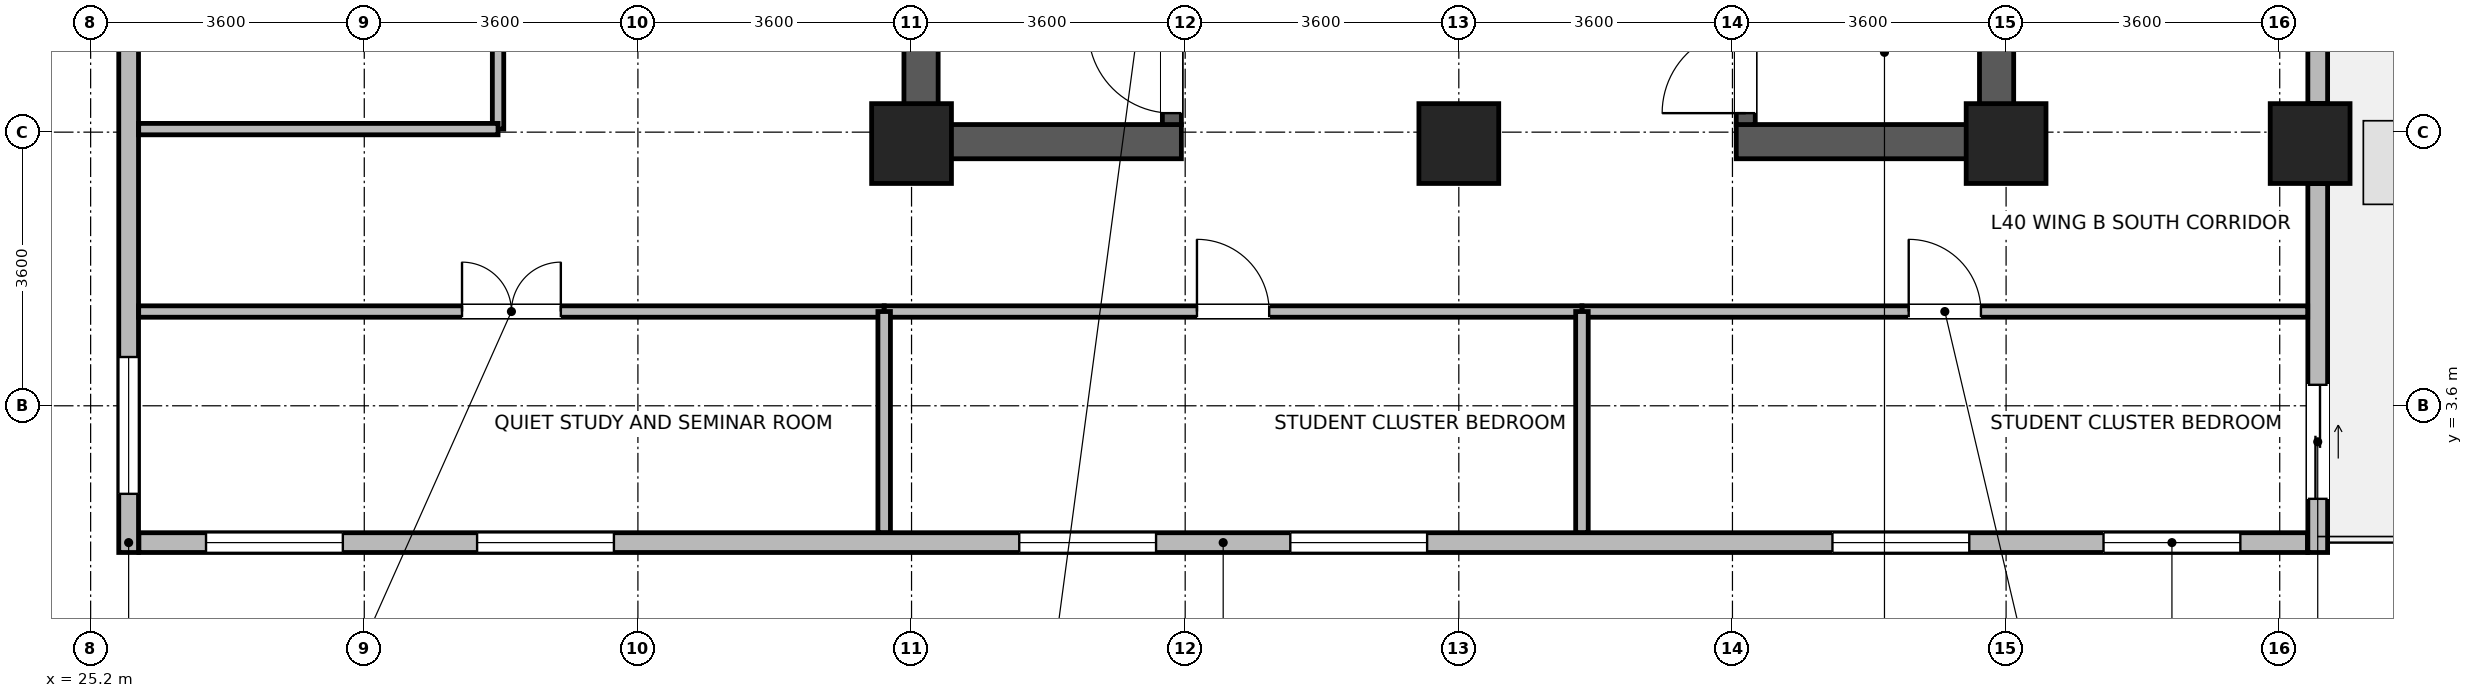
"""IFC4 building model, lengths in metres.
Left out: names, types, materials, properties, quantities, classifications, styles, units other than length and angle.
Written with IfcOpenShell. Run it as: python <this file> out.ifc"""

import sys

from ifc_helpers import new_model, si_unit, direction, frame, frame_2d, origin, origin_2d, place, context, subcontext, project, spatial, rectangle, extrude, source, transform, mapped, element, fill, save


model = new_model("IFC4")
c1 = context("Model", 3, precision=1e-05, world=origin(), true_north=direction((0.0, 1.0)))
c2 = subcontext(c1, "Body", "Model", "MODEL_VIEW")
j1 = project(units=[si_unit("LENGTHUNIT", "METRE"), si_unit("PLANEANGLEUNIT", "RADIAN")], contexts=[c1])
p1 = place(None, origin())
s1 = spatial("IfcSite", under=j1, at=p1, CompositionType="ELEMENT")
p2 = place(p1, origin())
s2 = spatial("IfcBuilding", under=s1, at=p2, CompositionType="ELEMENT")
p3 = place(p2, frame((0.0, 0.0, 158.7)))
s3 = spatial("IfcBuildingStorey", under=s2, at=p3, CompositionType="ELEMENT", Elevation=158.7)
for number, where, z_axis, x_axis in (
    (1, (36.125, 6.85, 0.0), (0.0, 0.0, 1.0), (0.0, 1.0, 0.0)),
    (2, (50.275, 6.85, 0.0), (0.0, 0.0, 1.0), (0.0, 1.0, 0.0)),
):
    element("IfcWall", number, at=place(p3, frame(where, z_axis=z_axis, x_axis=x_axis)), inside=s3, PredefinedType="SHEAR", context=c2, shape_type="SweptSolid", body=[
        extrude(rectangle(XDim=7.9, YDim=0.45, at=frame_2d((3.95, 0.0))), origin(), (0.0, 0.0, 1.0), 3.46),
    ])
for number, where, z_axis, x_axis in (
    (3, (36.35, 7.075, 0.0), (0.0, 0.0, 1.0), (1.0, 0.0, 0.0)),
    (4, (46.85, 7.075, 0.0), (0.0, 0.0, 1.0), (1.0, 0.0, 0.0)),
):
    element("IfcWall", number, at=place(p3, frame(where, z_axis=z_axis, x_axis=x_axis)), inside=s3, PredefinedType="SHEAR", context=c2, shape_type="SweptSolid", body=[
        extrude(rectangle(XDim=3.2, YDim=0.45, at=frame_2d((1.6, 0.0))), origin(), (0.0, 0.0, 1.0), 3.46),
    ])
p4 = place(p3, frame((39.425, 7.3, 0.0), z_axis=(0.0, 0.0, 1.0), x_axis=(0.0, 1.0, 0.0)))
e5 = element("IfcWall", 5, at=p4, inside=s3, PredefinedType="SHEAR", context=c2, shape_type="SweptSolid", body=[
    extrude(rectangle(XDim=7.0, YDim=0.25, at=frame_2d((3.5, 0.0))), origin(), (0.0, 0.0, 1.0), 3.46),
])
p5 = place(p4, frame((0.15, 0.0, 0.0)))
e6 = element("IfcOpeningElement", 6, at=p5, cuts=e5, PredefinedType="OPENING", context=c2, shape_type="SweptSolid", body=[
    extrude(rectangle(XDim=1.1, YDim=2.08, at=frame_2d((0.55, 1.04))), frame((0.0, 0.135, 0.0), z_axis=(0.0, -1.0, 0.0), x_axis=(1.0, 0.0, 0.0)), (0.0, 0.0, 1.0), 0.27),
])
p6 = place(p3, frame((46.975, 7.3, 0.0), z_axis=(0.0, 0.0, 1.0), x_axis=(0.0, 1.0, 0.0)))
e7 = element("IfcWall", 7, at=p6, inside=s3, PredefinedType="SHEAR", context=c2, shape_type="SweptSolid", body=[
    extrude(rectangle(XDim=7.0, YDim=0.25, at=frame_2d((3.5, 0.0))), origin(), (0.0, 0.0, 1.0), 3.46),
])
p7 = place(p6, frame((0.15, 0.0, 0.0)))
e8 = element("IfcOpeningElement", 8, at=p7, cuts=e7, PredefinedType="OPENING", context=c2, shape_type="SweptSolid", body=[
    extrude(rectangle(XDim=1.1, YDim=2.08, at=frame_2d((0.55, 1.04))), frame((0.0, 0.135, 0.0), z_axis=(0.0, -1.0, 0.0), x_axis=(1.0, 0.0, 0.0)), (0.0, 0.0, 1.0), 0.27),
])
m1 = source(origin(), c2, "Body", "SweptSolid", [
    extrude(rectangle(XDim=1.05, YDim=1.05, at=origin_2d()), origin(), (0.0, 0.0, 1.0), 3.7),
])
for number, where, z_axis, x_axis in (
    (9, (36.0, 7.05, 0.0), (0.0, 0.0, 1.0), (1.0, 0.0, 0.0)),
    (10, (43.2, 7.05, 0.0), (0.0, 0.0, 1.0), (1.0, 0.0, 0.0)),
    (11, (50.4, 7.05, 0.0), (0.0, 0.0, 1.0), (1.0, 0.0, 0.0)),
    (12, (54.4, 7.05, 0.0), (0.0, 0.0, 1.0), (1.0, 0.0, 0.0)),
):
    element("IfcColumn", number, at=place(p3, frame(where, z_axis=z_axis, x_axis=x_axis)), inside=s3, PredefinedType="COLUMN", context=c2, shape_type="MappedRepresentation", body=[
        mapped(m1, transform((0.0, 0.0, 0.0), x_axis=(1.0, 0.0, 0.0), y_axis=(0.0, 1.0, 0.0), z_axis=(0.0, 0.0, 1.0), scale=1.0)),
    ])
p8 = place(p3, frame((54.365, 1.8, 0.0), z_axis=(0.0, 0.0, 1.0), x_axis=(-1.0, 0.0, 0.0)))
e13 = element("IfcWall", 13, at=p8, inside=s3, PredefinedType="STANDARD", context=c2, shape_type="SweptSolid", body=[
    extrude(rectangle(XDim=28.53, YDim=0.26, at=frame_2d((14.265, 0.0))), origin(), (0.0, 0.0, 1.0), 3.44),
])
p9 = place(p8, frame((0.883, 0.0, 0.85)))
e14 = element("IfcOpeningElement", 14, at=p9, cuts=e13, PredefinedType="OPENING", context=c2, shape_type="SweptSolid", body=[
    extrude(rectangle(XDim=1.8, YDim=1.85, at=frame_2d((0.9, 0.925))), frame((0.0, 0.14, 0.0), z_axis=(0.0, -1.0, 0.0), x_axis=(1.0, 0.0, 0.0)), (0.0, 0.0, 1.0), 0.28),
])
p10 = place(p8, frame((4.449, 0.0, 0.85)))
e15 = element("IfcOpeningElement", 15, at=p10, cuts=e13, PredefinedType="OPENING", context=c2, shape_type="SweptSolid", body=[
    extrude(rectangle(XDim=1.8, YDim=1.85, at=frame_2d((0.9, 0.925))), frame((0.0, 0.14, 0.0), z_axis=(0.0, -1.0, 0.0), x_axis=(1.0, 0.0, 0.0)), (0.0, 0.0, 1.0), 0.28),
])
p11 = place(p8, frame((11.582, 0.0, 0.85)))
e16 = element("IfcOpeningElement", 16, at=p11, cuts=e13, PredefinedType="OPENING", context=c2, shape_type="SweptSolid", body=[
    extrude(rectangle(XDim=1.8, YDim=1.85, at=frame_2d((0.9, 0.925))), frame((0.0, 0.14, 0.0), z_axis=(0.0, -1.0, 0.0), x_axis=(1.0, 0.0, 0.0)), (0.0, 0.0, 1.0), 0.28),
])
p12 = place(p8, frame((15.148, 0.0, 0.85)))
e17 = element("IfcOpeningElement", 17, at=p12, cuts=e13, PredefinedType="OPENING", context=c2, shape_type="SweptSolid", body=[
    extrude(rectangle(XDim=1.8, YDim=1.85, at=frame_2d((0.9, 0.925))), frame((0.0, 0.14, 0.0), z_axis=(0.0, -1.0, 0.0), x_axis=(1.0, 0.0, 0.0)), (0.0, 0.0, 1.0), 0.28),
])
p13 = place(p8, frame((22.281, 0.0, 0.85)))
e18 = element("IfcOpeningElement", 18, at=p13, cuts=e13, PredefinedType="OPENING", context=c2, shape_type="SweptSolid", body=[
    extrude(rectangle(XDim=1.8, YDim=1.85, at=frame_2d((0.9, 0.925))), frame((0.0, 0.14, 0.0), z_axis=(0.0, -1.0, 0.0), x_axis=(1.0, 0.0, 0.0)), (0.0, 0.0, 1.0), 0.28),
])
p14 = place(p8, frame((25.847, 0.0, 0.85)))
e19 = element("IfcOpeningElement", 19, at=p14, cuts=e13, PredefinedType="OPENING", context=c2, shape_type="SweptSolid", body=[
    extrude(rectangle(XDim=1.8, YDim=1.85, at=frame_2d((0.9, 0.925))), frame((0.0, 0.14, 0.0), z_axis=(0.0, -1.0, 0.0), x_axis=(1.0, 0.0, 0.0)), (0.0, 0.0, 1.0), 0.28),
])
p15 = place(p3, frame((54.5, 6.524, 0.0), z_axis=(0.0, 0.0, 1.0), x_axis=(0.0, -1.0, 0.0)))
e20 = element("IfcWall", 20, at=p15, inside=s3, PredefinedType="STANDARD", context=c2, shape_type="SweptSolid", body=[
    extrude(rectangle(XDim=4.854, YDim=0.26, at=frame_2d((2.427, 0.0))), origin(), (0.0, 0.0, 1.0), 3.44),
])
p16 = place(p15, frame((2.648, 0.0, 0.0)))
e21 = element("IfcOpeningElement", 21, at=p16, cuts=e20, PredefinedType="OPENING", context=c2, shape_type="SweptSolid", body=[
    extrude(rectangle(XDim=1.5, YDim=2.15, at=frame_2d((0.75, 1.075))), frame((0.0, 0.14, 0.0), z_axis=(0.0, -1.0, 0.0), x_axis=(1.0, 0.0, 0.0)), (0.0, 0.0, 1.0), 0.28),
])
p17 = place(p3, frame((54.5, 14.024, 0.0), z_axis=(0.0, 0.0, 1.0), x_axis=(0.0, -1.0, 0.0)))
e22 = element("IfcWall", 22, at=p17, inside=s3, PredefinedType="STANDARD", context=c2, shape_type="SweptSolid", body=[
    extrude(rectangle(XDim=6.448, YDim=0.26, at=frame_2d((3.224, 0.0))), origin(), (0.0, 0.0, 1.0), 2.99),
])
p18 = place(p17, frame((3.936, 0.0, 0.85)))
e23 = element("IfcOpeningElement", 23, at=p18, cuts=e22, PredefinedType="OPENING", context=c2, shape_type="SweptSolid", body=[
    extrude(rectangle(XDim=1.8, YDim=1.85, at=frame_2d((0.9, 0.925))), frame((0.0, 0.14, 0.0), z_axis=(0.0, -1.0, 0.0), x_axis=(1.0, 0.0, 0.0)), (0.0, 0.0, 1.0), 0.28),
])
p19 = place(p17, frame((1.15, 0.0, 0.85)))
e24 = element("IfcOpeningElement", 24, at=p19, cuts=e22, PredefinedType="OPENING", context=c2, shape_type="SweptSolid", body=[
    extrude(rectangle(XDim=0.95, YDim=1.75, at=frame_2d((0.475, 0.875))), frame((0.0, 0.14, 0.0), z_axis=(0.0, -1.0, 0.0), x_axis=(1.0, 0.0, 0.0)), (0.0, 0.0, 1.0), 0.28),
])
p20 = place(p3, frame((25.7, 1.67, 0.0), z_axis=(0.0, 0.0, 1.0), x_axis=(0.0, 1.0, 0.0)))
e25 = element("IfcWall", 25, at=p20, inside=s3, PredefinedType="STANDARD", context=c2, shape_type="SweptSolid", body=[
    extrude(rectangle(XDim=20.06, YDim=0.26, at=frame_2d((10.03, 0.0))), origin(), (0.0, 0.0, 1.0), 3.44),
])
p21 = place(p20, frame((0.772, 0.0, 0.85)))
e26 = element("IfcOpeningElement", 26, at=p21, cuts=e25, PredefinedType="OPENING", context=c2, shape_type="SweptSolid", body=[
    extrude(rectangle(XDim=1.8, YDim=1.85, at=frame_2d((0.9, 0.925))), frame((0.0, 0.14, 0.0), z_axis=(0.0, -1.0, 0.0), x_axis=(1.0, 0.0, 0.0)), (0.0, 0.0, 1.0), 0.28),
])
p22 = place(p20, frame((7.458, 0.0, 0.85)))
e27 = element("IfcOpeningElement", 27, at=p22, cuts=e25, PredefinedType="OPENING", context=c2, shape_type="SweptSolid", body=[
    extrude(rectangle(XDim=1.8, YDim=1.85, at=frame_2d((0.9, 0.925))), frame((0.0, 0.14, 0.0), z_axis=(0.0, -1.0, 0.0), x_axis=(1.0, 0.0, 0.0)), (0.0, 0.0, 1.0), 0.28),
])
p23 = place(p20, frame((14.145, 0.0, 0.85)))
e28 = element("IfcOpeningElement", 28, at=p23, cuts=e25, PredefinedType="OPENING", context=c2, shape_type="SweptSolid", body=[
    extrude(rectangle(XDim=1.8, YDim=1.85, at=frame_2d((0.9, 0.925))), frame((0.0, 0.14, 0.0), z_axis=(0.0, -1.0, 0.0), x_axis=(1.0, 0.0, 0.0)), (0.0, 0.0, 1.0), 0.28),
])
p24 = place(p20, frame((17.488, 0.0, 0.85)))
e29 = element("IfcOpeningElement", 29, at=p24, cuts=e25, PredefinedType="OPENING", context=c2, shape_type="SweptSolid", body=[
    extrude(rectangle(XDim=1.8, YDim=1.85, at=frame_2d((0.9, 0.925))), frame((0.0, 0.14, 0.0), z_axis=(0.0, -1.0, 0.0), x_axis=(1.0, 0.0, 0.0)), (0.0, 0.0, 1.0), 0.28),
])
p25 = place(p3, frame((25.832, 4.84, 0.0), z_axis=(0.0, 0.0, 1.0), x_axis=(1.0, 0.0, 0.0)))
e30 = element("IfcWall", 30, at=p25, inside=s3, PredefinedType="PARTITIONING", context=c2, shape_type="SweptSolid", body=[
    extrude(rectangle(XDim=9.808, YDim=0.15, at=frame_2d((4.904, 0.0))), origin(), (0.0, 0.0, 1.0), 3.44),
])
p26 = place(p25, frame((4.254, 0.0, 0.0)))
e31 = element("IfcOpeningElement", 31, at=p26, cuts=e30, PredefinedType="OPENING", context=c2, shape_type="SweptSolid", body=[
    extrude(rectangle(XDim=1.3, YDim=2.12, at=frame_2d((0.65, 1.06))), frame((0.0, 0.085, 0.0), z_axis=(0.0, -1.0, 0.0), x_axis=(1.0, 0.0, 0.0)), (0.0, 0.0, 1.0), 0.17),
])
p27 = place(p3, frame((44.82, 4.84, 0.0), z_axis=(0.0, 0.0, 1.0), x_axis=(1.0, 0.0, 0.0)))
e32 = element("IfcWall", 32, at=p27, inside=s3, PredefinedType="PARTITIONING", context=c2, shape_type="SweptSolid", body=[
    extrude(rectangle(XDim=9.548, YDim=0.15, at=frame_2d((4.774, 0.0))), origin(), (0.0, 0.0, 1.0), 3.44),
])
p28 = place(p27, frame((4.299, 0.0, 0.0)))
e33 = element("IfcOpeningElement", 33, at=p28, cuts=e32, PredefinedType="OPENING", context=c2, shape_type="SweptSolid", body=[
    extrude(rectangle(XDim=0.95, YDim=2.1, at=frame_2d((0.475, 1.05))), frame((0.0, 0.085, 0.0), z_axis=(0.0, -1.0, 0.0), x_axis=(1.0, 0.0, 0.0)), (0.0, 0.0, 1.0), 0.17),
])
p29 = place(p3, frame((35.64, 4.84, 0.0), z_axis=(0.0, 0.0, 1.0), x_axis=(1.0, 0.0, 0.0)))
e34 = element("IfcWall", 34, at=p29, inside=s3, PredefinedType="PARTITIONING", context=c2, shape_type="SweptSolid", body=[
    extrude(rectangle(XDim=9.18, YDim=0.15, at=frame_2d((4.59, 0.0))), origin(), (0.0, 0.0, 1.0), 3.44),
])
p30 = place(p29, frame((4.115, 0.0, 0.0)))
e35 = element("IfcOpeningElement", 35, at=p30, cuts=e34, PredefinedType="OPENING", context=c2, shape_type="SweptSolid", body=[
    extrude(rectangle(XDim=0.95, YDim=2.1, at=frame_2d((0.475, 1.05))), frame((0.0, 0.085, 0.0), z_axis=(0.0, -1.0, 0.0), x_axis=(1.0, 0.0, 0.0)), (0.0, 0.0, 1.0), 0.17),
])
p31 = place(p3, frame((30.56, 7.24, 0.0), z_axis=(0.0, 0.0, 1.0), x_axis=(0.0, 1.0, 0.0)))
e36 = element("IfcWall", 36, at=p31, inside=s3, PredefinedType="PARTITIONING", context=c2, shape_type="SweptSolid", body=[
    extrude(rectangle(XDim=7.26, YDim=0.15, at=frame_2d((3.63, 0.0))), origin(), (0.0, 0.0, 1.0), 3.44),
])
p32 = place(p31, frame((2.98, 0.0, 0.0)))
e37 = element("IfcOpeningElement", 37, at=p32, cuts=e36, PredefinedType="OPENING", context=c2, shape_type="SweptSolid", body=[
    extrude(rectangle(XDim=1.3, YDim=2.12, at=frame_2d((0.65, 1.06))), frame((0.0, 0.085, 0.0), z_axis=(0.0, -1.0, 0.0), x_axis=(1.0, 0.0, 0.0)), (0.0, 0.0, 1.0), 0.17),
])
p33 = place(p3, frame((25.832, 7.24, 0.0), z_axis=(0.0, 0.0, 1.0), x_axis=(1.0, 0.0, 0.0)))
e38 = element("IfcWall", 38, at=p33, inside=s3, PredefinedType="PARTITIONING", context=c2, shape_type="SweptSolid", body=[
    extrude(rectangle(XDim=4.728, YDim=0.15, at=frame_2d((2.364, 0.0))), origin(), (0.0, 0.0, 1.0), 3.44),
])
for number, where, z_axis, x_axis in (
    (39, (35.64, 1.932, 0.0), (0.0, 0.0, 1.0), (0.0, 1.0, 0.0)),
    (40, (44.82, 1.932, 0.0), (0.0, 0.0, 1.0), (0.0, 1.0, 0.0)),
):
    element("IfcWall", number, at=place(p3, frame(where, z_axis=z_axis, x_axis=x_axis)), inside=s3, PredefinedType="PARTITIONING", context=c2, shape_type="SweptSolid", body=[
        extrude(rectangle(XDim=2.908, YDim=0.165, at=frame_2d((1.454, 0.0))), origin(), (0.0, 0.0, 1.0), 3.44),
    ])
p34 = place(p9, origin())
e41 = element("IfcWindow", 41, at=p34, inside=s3, PartitioningType="SINGLE_PANEL", PredefinedType="WINDOW", context=c2, shape_type="SweptSolid", body=[
    extrude(rectangle(XDim=1.8, YDim=1.85, at=frame_2d((0.9, 0.925))), frame((0.0, 0.03, 0.0), z_axis=(0.0, -1.0, 0.0), x_axis=(1.0, 0.0, 0.0)), (0.0, 0.0, 1.0), 0.06),
])
fill(e14, e41)
p35 = place(p10, origin())
e42 = element("IfcWindow", 42, at=p35, inside=s3, PartitioningType="SINGLE_PANEL", PredefinedType="WINDOW", context=c2, shape_type="SweptSolid", body=[
    extrude(rectangle(XDim=1.8, YDim=1.85, at=frame_2d((0.9, 0.925))), frame((0.0, 0.03, 0.0), z_axis=(0.0, -1.0, 0.0), x_axis=(1.0, 0.0, 0.0)), (0.0, 0.0, 1.0), 0.06),
])
fill(e15, e42)
p36 = place(p11, origin())
e43 = element("IfcWindow", 43, at=p36, inside=s3, PartitioningType="SINGLE_PANEL", PredefinedType="WINDOW", context=c2, shape_type="SweptSolid", body=[
    extrude(rectangle(XDim=1.8, YDim=1.85, at=frame_2d((0.9, 0.925))), frame((0.0, 0.03, 0.0), z_axis=(0.0, -1.0, 0.0), x_axis=(1.0, 0.0, 0.0)), (0.0, 0.0, 1.0), 0.06),
])
fill(e16, e43)
p37 = place(p12, origin())
e44 = element("IfcWindow", 44, at=p37, inside=s3, PartitioningType="SINGLE_PANEL", PredefinedType="WINDOW", context=c2, shape_type="SweptSolid", body=[
    extrude(rectangle(XDim=1.8, YDim=1.85, at=frame_2d((0.9, 0.925))), frame((0.0, 0.03, 0.0), z_axis=(0.0, -1.0, 0.0), x_axis=(1.0, 0.0, 0.0)), (0.0, 0.0, 1.0), 0.06),
])
fill(e17, e44)
p38 = place(p13, origin())
e45 = element("IfcWindow", 45, at=p38, inside=s3, PartitioningType="SINGLE_PANEL", PredefinedType="WINDOW", context=c2, shape_type="SweptSolid", body=[
    extrude(rectangle(XDim=1.8, YDim=1.85, at=frame_2d((0.9, 0.925))), frame((0.0, 0.03, 0.0), z_axis=(0.0, -1.0, 0.0), x_axis=(1.0, 0.0, 0.0)), (0.0, 0.0, 1.0), 0.06),
])
fill(e18, e45)
p39 = place(p14, origin())
e46 = element("IfcWindow", 46, at=p39, inside=s3, PartitioningType="SINGLE_PANEL", PredefinedType="WINDOW", context=c2, shape_type="SweptSolid", body=[
    extrude(rectangle(XDim=1.8, YDim=1.85, at=frame_2d((0.9, 0.925))), frame((0.0, 0.03, 0.0), z_axis=(0.0, -1.0, 0.0), x_axis=(1.0, 0.0, 0.0)), (0.0, 0.0, 1.0), 0.06),
])
fill(e19, e46)
p40 = place(p16, origin())
e47 = element("IfcDoor", 47, at=p40, inside=s3, OperationType="SLIDING_TO_LEFT", PredefinedType="DOOR", context=c2, shape_type="SweptSolid", body=[
    extrude(rectangle(XDim=1.5, YDim=2.15, at=frame_2d((0.75, 1.075))), frame((0.0, 0.025, 0.0), z_axis=(0.0, -1.0, 0.0), x_axis=(1.0, 0.0, 0.0)), (0.0, 0.0, 1.0), 0.05),
])
fill(e21, e47)
p41 = place(p21, origin())
e48 = element("IfcWindow", 48, at=p41, inside=s3, PartitioningType="SINGLE_PANEL", PredefinedType="WINDOW", context=c2, shape_type="SweptSolid", body=[
    extrude(rectangle(XDim=1.8, YDim=1.85, at=frame_2d((0.9, 0.925))), frame((0.0, 0.03, 0.0), z_axis=(0.0, -1.0, 0.0), x_axis=(1.0, 0.0, 0.0)), (0.0, 0.0, 1.0), 0.06),
])
fill(e26, e48)
p42 = place(p5, origin())
e49 = element("IfcDoor", 49, at=p42, inside=s3, OperationType="SINGLE_SWING_RIGHT", PredefinedType="DOOR", context=c2, shape_type="SweptSolid", body=[
    extrude(rectangle(XDim=1.1, YDim=2.08, at=frame_2d((0.55, 1.04))), frame((0.0, 0.025, 0.0), z_axis=(0.0, -1.0, 0.0), x_axis=(1.0, 0.0, 0.0)), (0.0, 0.0, 1.0), 0.05),
])
fill(e6, e49)
p43 = place(p7, origin())
e50 = element("IfcDoor", 50, at=p43, inside=s3, OperationType="SINGLE_SWING_LEFT", PredefinedType="DOOR", context=c2, shape_type="SweptSolid", body=[
    extrude(rectangle(XDim=1.1, YDim=2.08, at=frame_2d((0.55, 1.04))), frame((0.0, 0.025, 0.0), z_axis=(0.0, -1.0, 0.0), x_axis=(1.0, 0.0, 0.0)), (0.0, 0.0, 1.0), 0.05),
])
fill(e8, e50)
p44 = place(p26, origin())
e51 = element("IfcDoor", 51, at=p44, inside=s3, OperationType="DOUBLE_DOOR_SINGLE_SWING", PredefinedType="DOOR", context=c2, shape_type="SweptSolid", body=[
    extrude(rectangle(XDim=1.3, YDim=2.12, at=frame_2d((0.65, 1.06))), frame((0.0, 0.025, 0.0), z_axis=(0.0, -1.0, 0.0), x_axis=(1.0, 0.0, 0.0)), (0.0, 0.0, 1.0), 0.05),
])
fill(e31, e51)
p45 = place(p28, origin())
e52 = element("IfcDoor", 52, at=p45, inside=s3, OperationType="SINGLE_SWING_LEFT", PredefinedType="DOOR", context=c2, shape_type="SweptSolid", body=[
    extrude(rectangle(XDim=0.95, YDim=2.1, at=frame_2d((0.475, 1.05))), frame((0.0, 0.025, 0.0), z_axis=(0.0, -1.0, 0.0), x_axis=(1.0, 0.0, 0.0)), (0.0, 0.0, 1.0), 0.05),
])
fill(e33, e52)
p46 = place(p30, origin())
e53 = element("IfcDoor", 53, at=p46, inside=s3, OperationType="SINGLE_SWING_LEFT", PredefinedType="DOOR", context=c2, shape_type="SweptSolid", body=[
    extrude(rectangle(XDim=0.95, YDim=2.1, at=frame_2d((0.475, 1.05))), frame((0.0, 0.025, 0.0), z_axis=(0.0, -1.0, 0.0), x_axis=(1.0, 0.0, 0.0)), (0.0, 0.0, 1.0), 0.05),
])
fill(e35, e53)
save(model, sys.argv[1])
